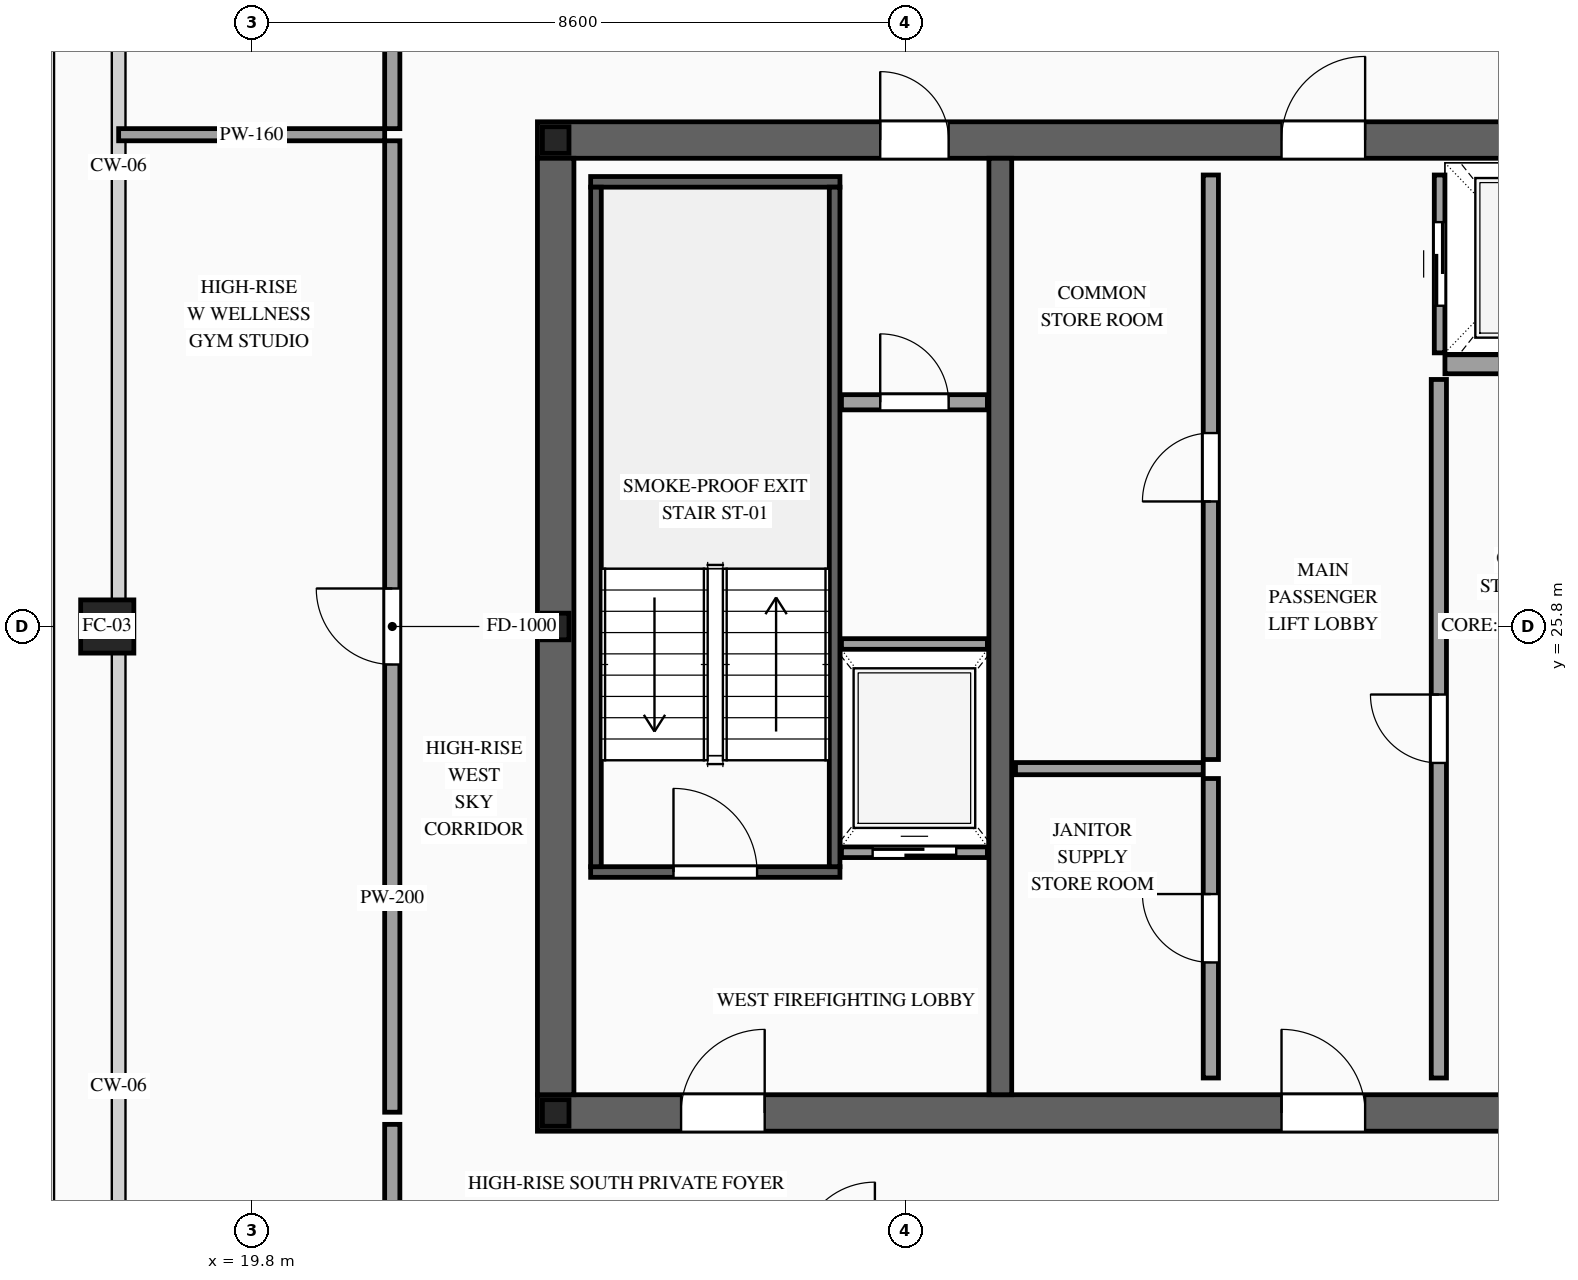
"""IFC4 building model, lengths in metres.
Left out: names, types, materials, properties, quantities, classifications, styles, units other than length and angle.
Written with IfcOpenShell. Run it as: python <this file> out.ifc"""

import sys

from ifc_helpers import new_model, si_unit, direction, frame, frame_2d, origin, origin_2d, place, context, subcontext, project, spatial, rectangle, hollow_rectangle, i_section, extrude, source, transform, mapped, element, fill, save


model = new_model("IFC4")
c1 = context("Model", 3, precision=1e-05, world=origin(), true_north=direction((0.0, 1.0)))
c2 = subcontext(c1, "Body", "Model", "MODEL_VIEW")
j1 = project(units=[si_unit("LENGTHUNIT", "METRE"), si_unit("PLANEANGLEUNIT", "RADIAN")], contexts=[c1])
p1 = place(None, origin())
s1 = spatial("IfcSite", under=j1, at=p1, CompositionType="ELEMENT")
p2 = place(p1, origin())
s2 = spatial("IfcBuilding", under=s1, at=p2, CompositionType="ELEMENT")
p3 = place(p2, frame((0.0, 0.0, 335.7)))
s3 = spatial("IfcBuildingStorey", under=s2, at=p3, CompositionType="ELEMENT", Elevation=335.7)
p4 = place(p3, frame((23.56, 19.4, 0.0), z_axis=(0.0, 0.0, 1.0), x_axis=(1.0, 0.0, 0.0)))
e1 = element("IfcWall", 1, at=p4, inside=s3, PredefinedType="SHEAR", context=c2, shape_type="SweptSolid", body=[
    extrude(rectangle(XDim=26.88, YDim=0.48, at=frame_2d((13.44, 0.0))), origin(), (0.0, 0.0, 1.0), 3.5),
])
p5 = place(p4, frame((1.89, 0.0, 0.0)))
e2 = element("IfcOpeningElement", 2, at=p5, cuts=e1, PredefinedType="OPENING", context=c2, shape_type="SweptSolid", body=[
    extrude(rectangle(XDim=1.1, YDim=2.2, at=frame_2d((0.55, 1.1))), frame((0.0, 0.255, 0.0), z_axis=(0.0, -1.0, 0.0), x_axis=(1.0, 0.0, 0.0)), (0.0, 0.0, 1.0), 0.51),
])
p6 = place(p4, frame((9.79, 0.0, 0.0)))
e3 = element("IfcOpeningElement", 3, at=p6, cuts=e1, PredefinedType="OPENING", context=c2, shape_type="SweptSolid", body=[
    extrude(rectangle(XDim=1.1, YDim=2.2, at=frame_2d((0.55, 1.1))), frame((0.0, 0.255, 0.0), z_axis=(0.0, -1.0, 0.0), x_axis=(1.0, 0.0, 0.0)), (0.0, 0.0, 1.0), 0.51),
])
p7 = place(p4, frame((22.99, 0.0, 0.0)))
e4 = element("IfcOpeningElement", 4, at=p7, cuts=e1, PredefinedType="OPENING", context=c2, shape_type="SweptSolid", body=[
    extrude(rectangle(XDim=1.1, YDim=2.2, at=frame_2d((0.55, 1.1))), frame((0.0, 0.255, 0.0), z_axis=(0.0, -1.0, 0.0), x_axis=(1.0, 0.0, 0.0)), (0.0, 0.0, 1.0), 0.51),
])
p8 = place(p4, frame((19.61, 0.0, 0.0)))
e5 = element("IfcOpeningElement", 5, at=p8, cuts=e1, PredefinedType="OPENING", context=c2, shape_type="SweptSolid", body=[
    extrude(rectangle(XDim=0.9, YDim=2.15, at=frame_2d((0.45, 1.075))), frame((0.0, 0.255, 0.0), z_axis=(0.0, -1.0, 0.0), x_axis=(1.0, 0.0, 0.0)), (0.0, 0.0, 1.0), 0.51),
])
p9 = place(p4, frame((18.17, 0.0, 0.0)))
e6 = element("IfcOpeningElement", 6, at=p9, cuts=e1, PredefinedType="OPENING", context=c2, shape_type="SweptSolid", body=[
    extrude(rectangle(XDim=0.9, YDim=2.15, at=frame_2d((0.45, 1.075))), frame((0.0, 0.255, 0.0), z_axis=(0.0, -1.0, 0.0), x_axis=(1.0, 0.0, 0.0)), (0.0, 0.0, 1.0), 0.51),
])
p10 = place(p3, frame((23.56, 32.2, 0.0), z_axis=(0.0, 0.0, 1.0), x_axis=(1.0, 0.0, 0.0)))
e7 = element("IfcWall", 7, at=p10, inside=s3, PredefinedType="SHEAR", context=c2, shape_type="SweptSolid", body=[
    extrude(rectangle(XDim=26.88, YDim=0.48, at=frame_2d((13.44, 0.0))), origin(), (0.0, 0.0, 1.0), 3.5),
])
p11 = place(p10, frame((4.51, 0.0, 0.0)))
e8 = element("IfcOpeningElement", 8, at=p11, cuts=e7, PredefinedType="OPENING", context=c2, shape_type="SweptSolid", body=[
    extrude(rectangle(XDim=0.9, YDim=2.15, at=frame_2d((0.45, 1.075))), frame((0.0, 0.255, 0.0), z_axis=(0.0, -1.0, 0.0), x_axis=(1.0, 0.0, 0.0)), (0.0, 0.0, 1.0), 0.51),
])
p12 = place(p10, frame((9.79, 0.0, 0.0)))
e9 = element("IfcOpeningElement", 9, at=p12, cuts=e7, PredefinedType="OPENING", context=c2, shape_type="SweptSolid", body=[
    extrude(rectangle(XDim=1.1, YDim=2.2, at=frame_2d((0.55, 1.1))), frame((0.0, 0.255, 0.0), z_axis=(0.0, -1.0, 0.0), x_axis=(1.0, 0.0, 0.0)), (0.0, 0.0, 1.0), 0.51),
])
p13 = place(p10, frame((15.64, 0.0, 0.0)))
e10 = element("IfcOpeningElement", 10, at=p13, cuts=e7, PredefinedType="OPENING", context=c2, shape_type="SweptSolid", body=[
    extrude(rectangle(XDim=1.1, YDim=2.2, at=frame_2d((0.55, 1.1))), frame((0.0, 0.255, 0.0), z_axis=(0.0, -1.0, 0.0), x_axis=(1.0, 0.0, 0.0)), (0.0, 0.0, 1.0), 0.51),
])
p14 = place(p10, frame((18.74, 0.0, 0.0)))
e11 = element("IfcOpeningElement", 11, at=p14, cuts=e7, PredefinedType="OPENING", context=c2, shape_type="SweptSolid", body=[
    extrude(rectangle(XDim=1.1, YDim=2.2, at=frame_2d((0.55, 1.1))), frame((0.0, 0.255, 0.0), z_axis=(0.0, -1.0, 0.0), x_axis=(1.0, 0.0, 0.0)), (0.0, 0.0, 1.0), 0.51),
])
m1 = source(origin(), c2, "Body", "SweptSolid", [
    extrude(rectangle(XDim=12.32, YDim=0.48, at=frame_2d((6.16, 0.0))), origin(), (0.0, 0.0, 1.0), 3.5),
])
p15 = place(p3, frame((23.8, 19.64, 0.0), z_axis=(0.0, 0.0, 1.0), x_axis=(0.0, 1.0, 0.0)))
e12 = element("IfcWall", 12, at=p15, inside=s3, PredefinedType="SHEAR", context=c2, shape_type="MappedRepresentation", body=[
    mapped(m1, transform((0.0, 0.0, 0.0), scale=1.0)),
])
m2 = source(origin(), c2, "Body", "SweptSolid", [
    extrude(rectangle(XDim=12.32, YDim=0.3, at=frame_2d((6.16, 0.0))), origin(), (0.0, 0.0, 1.0), 3.5),
])
p16 = place(p3, frame((29.65, 19.64, 0.0), z_axis=(0.0, 0.0, 1.0), x_axis=(0.0, 1.0, 0.0)))
e13 = element("IfcWall", 13, at=p16, inside=s3, PredefinedType="SOLIDWALL", context=c2, shape_type="MappedRepresentation", body=[
    mapped(m2, transform((0.0, 0.0, 0.0), scale=1.0)),
])
m3 = source(origin(), c2, "Body", "SweptSolid", [
    extrude(i_section(OverallWidth=0.35, OverallDepth=0.35, WebThickness=0.012, FlangeThickness=0.019, at=origin_2d()), origin(), (0.0, 0.0, 1.0), 3.5),
])
for number, where, z_axis, x_axis in (
    (14, (23.8, 19.4, 0.0), (0.0, 0.0, 1.0), (1.0, 0.0, 0.0)),
    (15, (23.8, 25.8, 0.0), (0.0, 0.0, 1.0), (1.0, 0.0, 0.0)),
    (16, (23.8, 32.2, 0.0), (0.0, 0.0, 1.0), (1.0, 0.0, 0.0)),
):
    element("IfcColumn", number, at=place(p3, frame(where, z_axis=z_axis, x_axis=x_axis)), inside=s3, PredefinedType="COLUMN", context=c2, shape_type="MappedRepresentation", body=[
        mapped(m3, transform((0.0, 0.0, 0.0), scale=1.0)),
    ])
m4 = source(origin(), c2, "Body", "SweptSolid", [
    extrude(hollow_rectangle(XDim=0.7, YDim=0.7, WallThickness=0.032, at=origin_2d()), origin(), (0.0, 0.0, 1.0), 3.5),
])
p17 = place(p3, frame((17.9, 25.8, 0.0), z_axis=(0.0, 0.0, 1.0), x_axis=(1.0, 0.0, 0.0)))
e17 = element("IfcColumn", 17, at=p17, inside=s3, PredefinedType="COLUMN", context=c2, shape_type="MappedRepresentation", body=[
    mapped(m4, transform((0.0, 0.0, 0.0), scale=1.0)),
])
p18 = place(p3, frame((27.56, 22.83, 0.0), z_axis=(0.0, 0.0, 1.0), x_axis=(1.0, 0.0, 0.0)))
e18 = element("IfcWall", 18, at=p18, inside=s3, PredefinedType="SOLIDWALL", context=c2, shape_type="SweptSolid", body=[
    extrude(rectangle(XDim=1.92, YDim=0.14, at=frame_2d((0.96, 0.0))), origin(), (0.0, 0.0, 1.0), 3.26),
])
p19 = place(p18, frame((0.41, 0.0, 0.0)))
e19 = element("IfcOpeningElement", 19, at=p19, cuts=e18, PredefinedType="OPENING", context=c2, shape_type="SweptSolid", body=[
    extrude(rectangle(XDim=1.1, YDim=2.2, at=frame_2d((0.55, 1.1))), frame((0.0, 0.085, 0.0), z_axis=(0.0, -1.0, 0.0), x_axis=(1.0, 0.0, 0.0)), (0.0, 0.0, 1.0), 0.17),
])
m5 = source(origin(), c2, "Body", "SweptSolid", [
    extrude(rectangle(XDim=1.92, YDim=0.14, at=frame_2d((0.96, 0.0))), origin(), (0.0, 0.0, 1.0), 3.26),
])
p20 = place(p3, frame((27.56, 25.57, 0.0), z_axis=(0.0, 0.0, 1.0), x_axis=(1.0, 0.0, 0.0)))
e20 = element("IfcWall", 20, at=p20, inside=s3, PredefinedType="SOLIDWALL", context=c2, shape_type="MappedRepresentation", body=[
    mapped(m5, transform((0.0, 0.0, 0.0), scale=1.0)),
])
p21 = place(p3, frame((35.43, 29.4, 0.0), z_axis=(0.0, 0.0, 1.0), x_axis=(0.0, 1.0, 0.0)))
e21 = element("IfcWall", 21, at=p21, inside=s3, PredefinedType="SOLIDWALL", context=c2, shape_type="SweptSolid", body=[
    extrude(rectangle(XDim=2.34, YDim=0.14, at=frame_2d((1.17, 0.0))), origin(), (0.0, 0.0, 1.0), 3.26),
])
p22 = place(p21, frame((0.62, 0.0, 0.0)))
e22 = element("IfcOpeningElement", 22, at=p22, cuts=e21, PredefinedType="OPENING", context=c2, shape_type="SweptSolid", body=[
    extrude(rectangle(XDim=1.1, YDim=2.2, at=frame_2d((0.55, 1.1))), frame((0.0, 0.085, 0.0), z_axis=(0.0, -1.0, 0.0), x_axis=(1.0, 0.0, 0.0)), (0.0, 0.0, 1.0), 0.17),
])
m6 = source(origin(), c2, "Body", "SweptSolid", [
    extrude(rectangle(XDim=2.4, YDim=0.25, at=frame_2d((1.2, 0.0))), origin(), (0.0, 0.0, 1.0), 3.26),
])
p23 = place(p3, frame((35.5, 29.25, 0.0), z_axis=(0.0, 0.0, 1.0), x_axis=(1.0, 0.0, 0.0)))
e23 = element("IfcWall", 23, at=p23, inside=s3, PredefinedType="SOLIDWALL", context=c2, shape_type="MappedRepresentation", body=[
    mapped(m6, transform((0.0, 0.0, 0.0), scale=1.0)),
])
p24 = place(p3, frame((24.26, 22.57, 0.0), z_axis=(0.0, 0.0, 1.0), x_axis=(1.0, 0.0, 0.0)))
e24 = element("IfcWall", 24, at=p24, inside=s3, PredefinedType="SOLIDWALL", context=c2, shape_type="SweptSolid", body=[
    extrude(rectangle(XDim=3.28, YDim=0.14, at=frame_2d((1.64, 0.0))), origin(), (0.0, 0.0, 1.0), 3.26),
])
p25 = place(p24, frame((1.09, 0.0, 0.0)))
e25 = element("IfcOpeningElement", 25, at=p25, cuts=e24, PredefinedType="OPENING", context=c2, shape_type="SweptSolid", body=[
    extrude(rectangle(XDim=1.1, YDim=2.2, at=frame_2d((0.55, 1.1))), frame((0.0, 0.085, 0.0), z_axis=(0.0, -1.0, 0.0), x_axis=(1.0, 0.0, 0.0)), (0.0, 0.0, 1.0), 0.17),
])
m7 = source(origin(), c2, "Body", "SweptSolid", [
    extrude(rectangle(XDim=3.28, YDim=0.14, at=frame_2d((1.64, 0.0))), origin(), (0.0, 0.0, 1.0), 3.26),
])
p26 = place(p3, frame((24.26, 31.65, 0.0), z_axis=(0.0, 0.0, 1.0), x_axis=(1.0, 0.0, 0.0)))
e26 = element("IfcWall", 26, at=p26, inside=s3, PredefinedType="SOLIDWALL", context=c2, shape_type="MappedRepresentation", body=[
    mapped(m7, transform((0.0, 0.0, 0.0), scale=1.0)),
])
m8 = source(origin(), c2, "Body", "SweptSolid", [
    extrude(rectangle(XDim=8.94, YDim=0.14, at=frame_2d((4.47, 0.0))), origin(), (0.0, 0.0, 1.0), 3.26),
])
for number, where, z_axis, x_axis in (
    (27, (24.33, 22.64, 0.0), (0.0, 0.0, 1.0), (0.0, 1.0, 0.0)),
    (28, (27.47, 22.64, 0.0), (0.0, 0.0, 1.0), (0.0, 1.0, 0.0)),
):
    element("IfcWall", number, at=place(p3, frame(where, z_axis=z_axis, x_axis=x_axis)), inside=s3, PredefinedType="SOLIDWALL", context=c2, shape_type="MappedRepresentation", body=[
        mapped(m8, transform((0.0, 0.0, 0.0), scale=1.0)),
    ])
p27 = place(p3, frame((27.56, 28.75, 0.0), z_axis=(0.0, 0.0, 1.0), x_axis=(1.0, 0.0, 0.0)))
e29 = element("IfcWall", 29, at=p27, inside=s3, PredefinedType="PARTITIONING", context=c2, shape_type="SweptSolid", body=[
    extrude(rectangle(XDim=1.92, YDim=0.2, at=frame_2d((0.96, 0.0))), origin(), (0.0, 0.0, 1.0), 3.26),
])
p28 = place(p27, frame((0.51, 0.0, 0.0)))
e30 = element("IfcOpeningElement", 30, at=p28, cuts=e29, PredefinedType="OPENING", context=c2, shape_type="SweptSolid", body=[
    extrude(rectangle(XDim=0.9, YDim=2.15, at=frame_2d((0.45, 1.075))), frame((0.0, 0.115, 0.0), z_axis=(0.0, -1.0, 0.0), x_axis=(1.0, 0.0, 0.0)), (0.0, 0.0, 1.0), 0.23),
])
p29 = place(p3, frame((32.42, 19.86, 0.0), z_axis=(0.0, 0.0, 1.0), x_axis=(0.0, 1.0, 0.0)))
e31 = element("IfcWall", 31, at=p29, inside=s3, PredefinedType="PARTITIONING", context=c2, shape_type="SweptSolid", body=[
    extrude(rectangle(XDim=3.94, YDim=0.2, at=frame_2d((1.97, 0.0))), origin(), (0.0, 0.0, 1.0), 3.26),
])
p30 = place(p29, frame((1.52, 0.0, 0.0)))
e32 = element("IfcOpeningElement", 32, at=p30, cuts=e31, PredefinedType="OPENING", context=c2, shape_type="SweptSolid", body=[
    extrude(rectangle(XDim=0.9, YDim=2.15, at=frame_2d((0.45, 1.075))), frame((0.0, 0.115, 0.0), z_axis=(0.0, -1.0, 0.0), x_axis=(1.0, 0.0, 0.0)), (0.0, 0.0, 1.0), 0.23),
])
p31 = place(p3, frame((32.42, 24.05, 0.0), z_axis=(0.0, 0.0, 1.0), x_axis=(0.0, 1.0, 0.0)))
e33 = element("IfcWall", 33, at=p31, inside=s3, PredefinedType="PARTITIONING", context=c2, shape_type="SweptSolid", body=[
    extrude(rectangle(XDim=7.69, YDim=0.2, at=frame_2d((3.845, 0.0))), origin(), (0.0, 0.0, 1.0), 3.26),
])
p32 = place(p31, frame((3.395, 0.0, 0.0)))
e34 = element("IfcOpeningElement", 34, at=p32, cuts=e33, PredefinedType="OPENING", context=c2, shape_type="SweptSolid", body=[
    extrude(rectangle(XDim=0.9, YDim=2.15, at=frame_2d((0.45, 1.075))), frame((0.0, 0.115, 0.0), z_axis=(0.0, -1.0, 0.0), x_axis=(1.0, 0.0, 0.0)), (0.0, 0.0, 1.0), 0.23),
])
m9 = source(origin(), c2, "Body", "SweptSolid", [
    extrude(rectangle(XDim=2.47, YDim=0.16, at=frame_2d((1.235, 0.0))), origin(), (0.0, 0.0, 1.0), 3.26),
])
p33 = place(p3, frame((29.85, 23.93, 0.0), z_axis=(0.0, 0.0, 1.0), x_axis=(1.0, 0.0, 0.0)))
e35 = element("IfcWall", 35, at=p33, inside=s3, PredefinedType="PARTITIONING", context=c2, shape_type="MappedRepresentation", body=[
    mapped(m9, transform((0.0, 0.0, 0.0), scale=1.0)),
])
p34 = place(p3, frame((35.42, 19.86, 0.0), z_axis=(0.0, 0.0, 1.0), x_axis=(0.0, 1.0, 0.0)))
e36 = element("IfcWall", 36, at=p34, inside=s3, PredefinedType="PARTITIONING", context=c2, shape_type="SweptSolid", body=[
    extrude(rectangle(XDim=9.19, YDim=0.2, at=frame_2d((4.595, 0.0))), origin(), (0.0, 0.0, 1.0), 3.26),
])
p35 = place(p34, frame((4.145, 0.0, 0.0)))
e37 = element("IfcOpeningElement", 37, at=p35, cuts=e36, PredefinedType="OPENING", context=c2, shape_type="SweptSolid", body=[
    extrude(rectangle(XDim=0.9, YDim=2.15, at=frame_2d((0.45, 1.075))), frame((0.0, 0.115, 0.0), z_axis=(0.0, -1.0, 0.0), x_axis=(1.0, 0.0, 0.0)), (0.0, 0.0, 1.0), 0.23),
])
m10 = source(origin(), c2, "Body", "SweptSolid", [
    extrude(rectangle(XDim=1.7, YDim=0.2, at=frame_2d((0.85, 0.0))), origin(), (0.0, 0.0, 1.0), 3.26),
])
for number, where, z_axis, x_axis in (
    (38, (21.65, 32.35, 0.0), (0.0, 0.0, 1.0), (0.0, 1.0, 0.0)),
    (39, (21.65, 17.55, 0.0), (0.0, 0.0, 1.0), (0.0, 1.0, 0.0)),
):
    element("IfcWall", number, at=place(p3, frame(where, z_axis=z_axis, x_axis=x_axis)), inside=s3, PredefinedType="PARTITIONING", context=c2, shape_type="MappedRepresentation", body=[
        mapped(m10, transform((0.0, 0.0, 0.0), scale=1.0)),
    ])
p36 = place(p3, frame((21.65, 19.41, 0.0), z_axis=(0.0, 0.0, 1.0), x_axis=(0.0, 1.0, 0.0)))
e40 = element("IfcWall", 40, at=p36, inside=s3, PredefinedType="PARTITIONING", context=c2, shape_type="SweptSolid", body=[
    extrude(rectangle(XDim=12.78, YDim=0.2, at=frame_2d((6.39, 0.0))), origin(), (0.0, 0.0, 1.0), 3.26),
])
p37 = place(p36, frame((5.89, 0.0, 0.0)))
e41 = element("IfcOpeningElement", 41, at=p37, cuts=e40, PredefinedType="OPENING", context=c2, shape_type="SweptSolid", body=[
    extrude(rectangle(XDim=1.0, YDim=2.2, at=frame_2d((0.5, 1.1))), frame((0.0, 0.115, 0.0), z_axis=(0.0, -1.0, 0.0), x_axis=(1.0, 0.0, 0.0)), (0.0, 0.0, 1.0), 0.23),
])
m11 = source(origin(), c2, "Body", "SweptSolid", [
    extrude(rectangle(XDim=3.5, YDim=0.16, at=frame_2d((1.75, 0.0))), origin(), (0.0, 0.0, 1.0), 2.805),
])
p38 = place(p3, frame((18.05, 32.27, 0.0), z_axis=(0.0, 0.0, 1.0), x_axis=(1.0, 0.0, 0.0)))
e42 = element("IfcWall", 42, at=p38, inside=s3, PredefinedType="PARTITIONING", context=c2, shape_type="MappedRepresentation", body=[
    mapped(m11, transform((0.0, 0.0, 0.0), scale=1.0)),
])
m12 = source(origin(), c2, "Body", "SweptSolid", [
    extrude(rectangle(XDim=1.1, YDim=2.2, at=frame_2d((0.55, 1.1))), frame((0.0, 0.025, 0.0), z_axis=(0.0, -1.0, 0.0), x_axis=(1.0, 0.0, 0.0)), (0.0, 0.0, 1.0), 0.05),
])
p39 = place(p19, origin())
e43 = element("IfcDoor", 43, at=p39, inside=s3, OperationType="SLIDING_TO_LEFT", PredefinedType="DOOR", context=c2, shape_type="MappedRepresentation", body=[
    mapped(m12, transform((0.0, 0.0, 0.0), scale=1.0)),
])
fill(e19, e43)
p40 = place(p22, origin())
e44 = element("IfcDoor", 44, at=p40, inside=s3, OperationType="SLIDING_TO_RIGHT", PredefinedType="DOOR", context=c2, shape_type="MappedRepresentation", body=[
    mapped(m12, transform((0.0, 0.0, 0.0), scale=1.0)),
])
fill(e22, e44)
m13 = source(origin(), c2, "Body", "SweptSolid", [
    extrude(rectangle(XDim=1.1, YDim=2.2, at=frame_2d((0.55, 1.1))), frame((0.0, 0.025, 0.0), z_axis=(0.0, -1.0, 0.0), x_axis=(1.0, 0.0, 0.0)), (0.0, 0.0, 1.0), 0.05),
])
p41 = place(p25, origin())
e45 = element("IfcDoor", 45, at=p41, inside=s3, OperationType="SINGLE_SWING_LEFT", PredefinedType="DOOR", context=c2, shape_type="MappedRepresentation", body=[
    mapped(m13, transform((0.0, 0.0, 0.0), scale=1.0)),
])
fill(e25, e45)
p42 = place(p5, origin())
e46 = element("IfcDoor", 46, at=p42, inside=s3, OperationType="SINGLE_SWING_RIGHT", PredefinedType="DOOR", context=c2, shape_type="MappedRepresentation", body=[
    mapped(m13, transform((0.0, 0.0, 0.0), scale=1.0)),
])
fill(e2, e46)
p43 = place(p6, origin())
e47 = element("IfcDoor", 47, at=p43, inside=s3, OperationType="SINGLE_SWING_LEFT", PredefinedType="DOOR", context=c2, shape_type="MappedRepresentation", body=[
    mapped(m13, transform((0.0, 0.0, 0.0), scale=1.0)),
])
fill(e3, e47)
m14 = source(origin(), c2, "Body", "SweptSolid", [
    extrude(rectangle(XDim=0.9, YDim=2.15, at=frame_2d((0.45, 1.075))), frame((0.0, 0.025, 0.0), z_axis=(0.0, -1.0, 0.0), x_axis=(1.0, 0.0, 0.0)), (0.0, 0.0, 1.0), 0.05),
])
p44 = place(p11, origin())
e48 = element("IfcDoor", 48, at=p44, inside=s3, OperationType="SINGLE_SWING_LEFT", PredefinedType="DOOR", context=c2, shape_type="MappedRepresentation", body=[
    mapped(m14, transform((0.0, 0.0, 0.0), scale=1.0)),
])
fill(e8, e48)
p45 = place(p12, origin())
e49 = element("IfcDoor", 49, at=p45, inside=s3, OperationType="SINGLE_SWING_RIGHT", PredefinedType="DOOR", context=c2, shape_type="MappedRepresentation", body=[
    mapped(m13, transform((0.0, 0.0, 0.0), scale=1.0)),
])
fill(e9, e49)
p46 = place(p28, origin())
e50 = element("IfcDoor", 50, at=p46, inside=s3, OperationType="SINGLE_SWING_LEFT", PredefinedType="DOOR", context=c2, shape_type="MappedRepresentation", body=[
    mapped(m14, transform((0.0, 0.0, 0.0), scale=1.0)),
])
fill(e30, e50)
p47 = place(p30, origin())
e51 = element("IfcDoor", 51, at=p47, inside=s3, OperationType="SINGLE_SWING_RIGHT", PredefinedType="DOOR", context=c2, shape_type="MappedRepresentation", body=[
    mapped(m14, transform((0.0, 0.0, 0.0), scale=1.0)),
])
fill(e32, e51)
p48 = place(p32, origin())
e52 = element("IfcDoor", 52, at=p48, inside=s3, OperationType="SINGLE_SWING_LEFT", PredefinedType="DOOR", context=c2, shape_type="MappedRepresentation", body=[
    mapped(m14, transform((0.0, 0.0, 0.0), scale=1.0)),
])
fill(e34, e52)
p49 = place(p35, origin())
e53 = element("IfcDoor", 53, at=p49, inside=s3, OperationType="SINGLE_SWING_RIGHT", PredefinedType="DOOR", context=c2, shape_type="MappedRepresentation", body=[
    mapped(m14, transform((0.0, 0.0, 0.0), scale=1.0)),
])
fill(e37, e53)
m15 = source(origin(), c2, "Body", "SweptSolid", [
    extrude(rectangle(XDim=1.0, YDim=2.2, at=frame_2d((0.5, 1.1))), frame((0.0, 0.025, 0.0), z_axis=(0.0, -1.0, 0.0), x_axis=(1.0, 0.0, 0.0)), (0.0, 0.0, 1.0), 0.05),
])
p50 = place(p37, origin())
e54 = element("IfcDoor", 54, at=p50, inside=s3, OperationType="SINGLE_SWING_RIGHT", PredefinedType="DOOR", context=c2, shape_type="MappedRepresentation", body=[
    mapped(m15, transform((0.0, 0.0, 0.0), scale=1.0)),
])
fill(e41, e54)
save(model, sys.argv[1])
